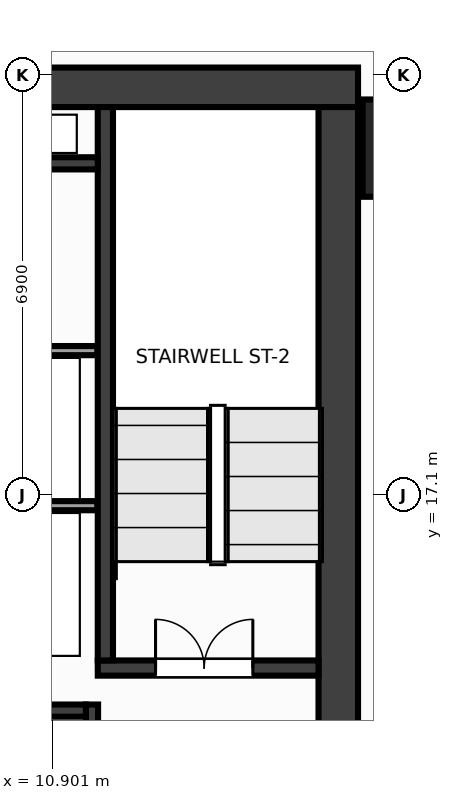
"""IFC4 building model, lengths in metres.
Left out: names, types, materials, properties, quantities, classifications, styles, units other than length and angle.
Written with IfcOpenShell. Run it as: python <this file> out.ifc"""

import sys

from ifc_helpers import new_model, si_unit, direction, frame, frame_2d, origin, origin_2d, place, context, subcontext, project, spatial, rectangle, extrude, source, transform, mapped, element, fill, save


model = new_model("IFC4")
c1 = context("Model", 3, precision=1e-05, world=origin(), true_north=direction((0.0, 1.0)))
c2 = subcontext(c1, "Body", "Model", "MODEL_VIEW")
j1 = project(units=[si_unit("LENGTHUNIT", "METRE"), si_unit("PLANEANGLEUNIT", "RADIAN")], contexts=[c1])
p1 = place(None, origin())
s1 = spatial("IfcSite", under=j1, at=p1, CompositionType="ELEMENT")
p2 = place(p1, origin())
s2 = spatial("IfcBuilding", under=s1, at=p2, CompositionType="ELEMENT")
p3 = place(p2, frame((0.0, 0.0, 178.4)))
s3 = spatial("IfcBuildingStorey", under=s2, at=p3, CompositionType="ELEMENT", Elevation=178.4)
m1 = source(origin(), c2, "Body", "SweptSolid", [
    extrude(rectangle(XDim=31.85, YDim=0.65, at=frame_2d((15.925, 0.0))), origin(), (0.0, 0.0, 1.0), 3.6),
])
p4 = place(p3, frame((-15.925, 23.8, 0.0), z_axis=(0.0, 0.0, 1.0), x_axis=(1.0, 0.0, 0.0)))
e1 = element("IfcWall", 1, at=p4, inside=s3, PredefinedType="SHEAR", context=c2, shape_type="MappedRepresentation", body=[
    mapped(m1, transform((0.0, 0.0, 0.0), x_axis=(1.0, 0.0, 0.0), y_axis=(0.0, 1.0, 0.0), z_axis=(0.0, 0.0, 1.0), scale=1.0)),
])
m2 = source(origin(), c2, "Body", "SweptSolid", [
    extrude(rectangle(XDim=12.95, YDim=0.65, at=frame_2d((6.475, 0.0))), origin(), (0.0, 0.0, 1.0), 3.6),
])
p5 = place(p3, frame((15.6, 10.525, 0.0), z_axis=(0.0, 0.0, 1.0), x_axis=(0.0, 1.0, 0.0)))
e2 = element("IfcWall", 2, at=p5, inside=s3, PredefinedType="SHEAR", context=c2, shape_type="MappedRepresentation", body=[
    mapped(m2, transform((0.0, 0.0, 0.0), x_axis=(1.0, 0.0, 0.0), y_axis=(0.0, 1.0, 0.0), z_axis=(0.0, 0.0, 1.0), scale=1.0)),
])
m3 = source(origin(), c2, "Body", "SweptSolid", [
    extrude(rectangle(XDim=3.63, YDim=0.25, at=frame_2d((1.815, 0.0))), origin(), (0.0, 0.0, 1.0), 3.6),
])
p6 = place(p3, frame((11.645, 14.25, 0.0), z_axis=(0.0, 0.0, 1.0), x_axis=(1.0, 0.0, 0.0)))
e3 = element("IfcWall", 3, at=p6, inside=s3, PredefinedType="SHEAR", context=c2, shape_type="MappedRepresentation", body=[
    mapped(m3, transform((0.0, 0.0, 0.0), x_axis=(1.0, 0.0, 0.0), y_axis=(0.0, 1.0, 0.0), z_axis=(0.0, 0.0, 1.0), scale=1.0)),
])
p7 = place(p6, frame((0.95, 0.0, 0.0)))
e4 = element("IfcOpeningElement", 4, at=p7, cuts=e3, PredefinedType="OPENING", context=c2, shape_type="SweptSolid", body=[
    extrude(rectangle(XDim=1.6, YDim=2.15, at=frame_2d((0.8, 1.075))), frame((0.0, 0.137, 0.0), z_axis=(0.0, -1.0, 0.0), x_axis=(1.0, 0.0, 0.0)), (0.0, 0.0, 1.0), 0.274),
])
m4 = source(origin(), c2, "Body", "SweptSolid", [
    extrude(rectangle(XDim=9.1, YDim=0.25, at=frame_2d((4.55, 0.0))), origin(), (0.0, 0.0, 1.0), 3.6),
])
p8 = place(p3, frame((11.77, 14.375, 0.0), z_axis=(0.0, 0.0, 1.0), x_axis=(0.0, 1.0, 0.0)))
e5 = element("IfcWall", 5, at=p8, inside=s3, PredefinedType="SHEAR", context=c2, shape_type="MappedRepresentation", body=[
    mapped(m4, transform((0.0, 0.0, 0.0), x_axis=(1.0, 0.0, 0.0), y_axis=(0.0, 1.0, 0.0), z_axis=(0.0, 0.0, 1.0), scale=1.0)),
])
m5 = source(origin(), c2, "Body", "SweptSolid", [
    extrude(rectangle(XDim=3.125, YDim=0.2, at=frame_2d((1.562, 0.0))), origin(), (0.0, 0.0, 1.0), 3.6),
])
p9 = place(p3, frame((11.55, 10.525, 0.0), z_axis=(0.0, 0.0, 1.0), x_axis=(0.0, 1.0, 0.0)))
e6 = element("IfcWall", 6, at=p9, inside=s3, PredefinedType="SHEAR", context=c2, shape_type="MappedRepresentation", body=[
    mapped(m5, transform((0.0, 0.0, 0.0), x_axis=(1.0, 0.0, 0.0), y_axis=(0.0, 1.0, 0.0), z_axis=(0.0, 0.0, 1.0), scale=1.0)),
])
p10 = place(p9, frame((0.9, 0.0, 0.0)))
e7 = element("IfcOpeningElement", 7, at=p10, cuts=e6, PredefinedType="OPENING", context=c2, shape_type="SweptSolid", body=[
    extrude(rectangle(XDim=1.1, YDim=2.15, at=frame_2d((0.55, 1.075))), frame((0.0, 0.112, 0.0), z_axis=(0.0, -1.0, 0.0), x_axis=(1.0, 0.0, 0.0)), (0.0, 0.0, 1.0), 0.224),
])
m6 = source(origin(), c2, "Body", "SweptSolid", [
    extrude(rectangle(XDim=2.825, YDim=0.2, at=frame_2d((1.413, 0.0))), origin(), (0.0, 0.0, 1.0), 3.6),
])
p11 = place(p3, frame((8.625, 13.55, 0.0), z_axis=(0.0, 0.0, 1.0), x_axis=(1.0, 0.0, 0.0)))
e8 = element("IfcWall", 8, at=p11, inside=s3, PredefinedType="SHEAR", context=c2, shape_type="MappedRepresentation", body=[
    mapped(m6, transform((0.0, 0.0, 0.0), x_axis=(1.0, 0.0, 0.0), y_axis=(0.0, 1.0, 0.0), z_axis=(0.0, 0.0, 1.0), scale=1.0)),
])
m7 = source(origin(), c2, "Body", "SweptSolid", [
    extrude(rectangle(XDim=3.02, YDim=0.2, at=frame_2d((1.51, 0.0))), origin(), (0.0, 0.0, 1.0), 3.6),
])
p12 = place(p3, frame((8.625, 22.55, 0.0), z_axis=(0.0, 0.0, 1.0), x_axis=(1.0, 0.0, 0.0)))
e9 = element("IfcWall", 9, at=p12, inside=s3, PredefinedType="SHEAR", context=c2, shape_type="MappedRepresentation", body=[
    mapped(m7, transform((0.0, 0.0, 0.0), x_axis=(1.0, 0.0, 0.0), y_axis=(0.0, 1.0, 0.0), z_axis=(0.0, 0.0, 1.0), scale=1.0)),
])
m8 = source(origin(), c2, "Body", "SweptSolid", [
    extrude(rectangle(XDim=1.6, YDim=1.6, at=origin_2d()), origin(), (0.0, 0.0, 1.0), 3.6),
])
p13 = place(p3, frame((16.8, 22.8, 0.0), z_axis=(0.0, 0.0, 1.0), x_axis=(1.0, 0.0, 0.0)))
e10 = element("IfcColumn", 10, at=p13, inside=s3, PredefinedType="COLUMN", context=c2, shape_type="MappedRepresentation", body=[
    mapped(m8, transform((0.0, 0.0, 0.0), x_axis=(1.0, 0.0, 0.0), y_axis=(0.0, 1.0, 0.0), z_axis=(0.0, 0.0, 1.0), scale=1.0)),
])
m9 = source(origin(), c2, "Body", "SweptSolid", [
    extrude(rectangle(XDim=3.01, YDim=0.15, at=frame_2d((1.505, 0.0))), origin(), (0.0, 0.0, 1.0), 3.38),
])
for number, where, z_axis, x_axis in (
    (11, (8.63, 16.92, 0.0), (0.0, 0.0, 1.0), (1.0, 0.0, 0.0)),
    (12, (8.63, 19.47, 0.0), (0.0, 0.0, 1.0), (1.0, 0.0, 0.0)),
):
    element("IfcWall", number, at=place(p3, frame(where, z_axis=z_axis, x_axis=x_axis)), inside=s3, PredefinedType="PARTITIONING", context=c2, shape_type="MappedRepresentation", body=[
        mapped(m9, transform((0.0, 0.0, 0.0), x_axis=(1.0, 0.0, 0.0), y_axis=(0.0, 1.0, 0.0), z_axis=(0.0, 0.0, 1.0), scale=1.0)),
    ])
m10 = source(origin(), c2, "Body", "SweptSolid", [
    extrude(rectangle(XDim=1.6, YDim=2.15, at=frame_2d((0.8, 1.075))), frame((0.0, 0.025, 0.0), z_axis=(0.0, -1.0, 0.0), x_axis=(1.0, 0.0, 0.0)), (0.0, 0.0, 1.0), 0.05),
])
p14 = place(p7, origin())
e13 = element("IfcDoor", 13, at=p14, inside=s3, OperationType="DOUBLE_DOOR_SINGLE_SWING", PredefinedType="DOOR", context=c2, shape_type="MappedRepresentation", body=[
    mapped(m10, transform((0.0, 0.0, 0.0), x_axis=(1.0, 0.0, 0.0), y_axis=(0.0, 1.0, 0.0), z_axis=(0.0, 0.0, 1.0), scale=1.0)),
])
fill(e4, e13)
save(model, sys.argv[1])
